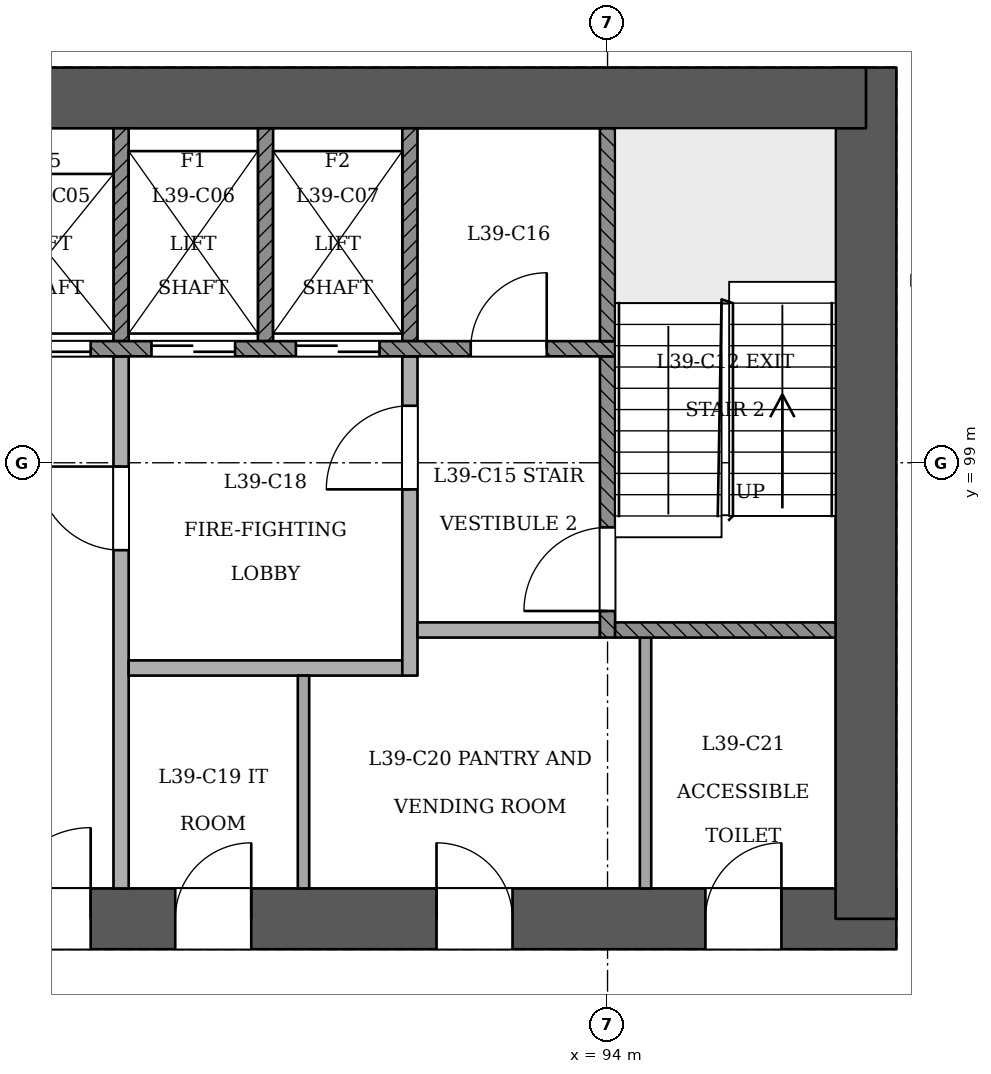
"""IFC4 building model, lengths in metres.
Left out: names, types, materials, properties, quantities, classifications, styles, units other than length and angle.
Written with IfcOpenShell. Run it as: python <this file> out.ifc"""

import sys

from ifc_helpers import new_model, si_unit, direction, frame, frame_2d, origin, place, context, subcontext, project, spatial, rectangle, extrude, element, fill, save


model = new_model("IFC4")
c1 = context("Model", 3, precision=1e-05, world=origin(), true_north=direction((0.0, 1.0)))
c2 = subcontext(c1, "Body", "Model", "MODEL_VIEW")
j1 = project(units=[si_unit("LENGTHUNIT", "METRE"), si_unit("PLANEANGLEUNIT", "RADIAN")], contexts=[c1])
p1 = place(None, origin())
s1 = spatial("IfcSite", under=j1, at=p1, CompositionType="ELEMENT")
p2 = place(p1, origin())
s2 = spatial("IfcBuilding", under=s1, at=p2, CompositionType="ELEMENT")
p3 = place(p2, frame((0.0, 0.0, 153.0)))
s3 = spatial("IfcBuildingStorey", under=s2, at=p3, CompositionType="ELEMENT", Elevation=153.0)
p4 = place(p3, frame((72.6, 93.0, 0.0), z_axis=(0.0, 0.0, 1.0), x_axis=(1.0, 0.0, 0.0)))
e1 = element("IfcWall", 1, at=p4, inside=s3, PredefinedType="SHEAR", context=c2, shape_type="SweptSolid", body=[
    extrude(rectangle(XDim=25.2, YDim=0.8, at=frame_2d((12.6, 0.0))), origin(), (0.0, 0.0, 1.0), 3.6),
])
p5 = place(p4, frame((1.2, 0.0, 0.0)))
e2 = element("IfcOpeningElement", 2, at=p5, cuts=e1, PredefinedType="OPENING", context=c2, shape_type="SweptSolid", body=[
    extrude(rectangle(XDim=1.2, YDim=2.1, at=frame_2d((0.6, 1.05))), frame((0.0, 0.411, 0.0), z_axis=(0.0, -1.0, 0.0), x_axis=(1.0, 0.0, 0.0)), (0.0, 0.0, 1.0), 0.821),
])
p6 = place(p4, frame((3.4, 0.0, 0.0)))
e3 = element("IfcOpeningElement", 3, at=p6, cuts=e1, PredefinedType="OPENING", context=c2, shape_type="SweptSolid", body=[
    extrude(rectangle(XDim=1.2, YDim=2.1, at=frame_2d((0.6, 1.05))), frame((0.0, 0.411, 0.0), z_axis=(0.0, -1.0, 0.0), x_axis=(1.0, 0.0, 0.0)), (0.0, 0.0, 1.0), 0.821),
])
p7 = place(p4, frame((13.4, 0.0, 0.0)))
e4 = element("IfcOpeningElement", 4, at=p7, cuts=e1, PredefinedType="OPENING", context=c2, shape_type="SweptSolid", body=[
    extrude(rectangle(XDim=1.2, YDim=2.1, at=frame_2d((0.6, 1.05))), frame((0.0, 0.411, 0.0), z_axis=(0.0, -1.0, 0.0), x_axis=(1.0, 0.0, 0.0)), (0.0, 0.0, 1.0), 0.821),
])
p8 = place(p4, frame((15.712, 0.0, 0.0)))
e5 = element("IfcOpeningElement", 5, at=p8, cuts=e1, PredefinedType="OPENING", context=c2, shape_type="SweptSolid", body=[
    extrude(rectangle(XDim=1.0, YDim=2.1, at=frame_2d((0.5, 1.05))), frame((0.0, 0.411, 0.0), z_axis=(0.0, -1.0, 0.0), x_axis=(1.0, 0.0, 0.0)), (0.0, 0.0, 1.0), 0.821),
])
p9 = place(p4, frame((19.15, 0.0, 0.0)))
e6 = element("IfcOpeningElement", 6, at=p9, cuts=e1, PredefinedType="OPENING", context=c2, shape_type="SweptSolid", body=[
    extrude(rectangle(XDim=1.0, YDim=2.1, at=frame_2d((0.5, 1.05))), frame((0.0, 0.411, 0.0), z_axis=(0.0, -1.0, 0.0), x_axis=(1.0, 0.0, 0.0)), (0.0, 0.0, 1.0), 0.821),
])
p10 = place(p4, frame((22.688, 0.0, 0.0)))
e7 = element("IfcOpeningElement", 7, at=p10, cuts=e1, PredefinedType="OPENING", context=c2, shape_type="SweptSolid", body=[
    extrude(rectangle(XDim=1.0, YDim=2.1, at=frame_2d((0.5, 1.05))), frame((0.0, 0.411, 0.0), z_axis=(0.0, -1.0, 0.0), x_axis=(1.0, 0.0, 0.0)), (0.0, 0.0, 1.0), 0.821),
])
p11 = place(p3, frame((97.4, 93.0, 0.0), z_axis=(0.0, 0.0, 1.0), x_axis=(0.0, 1.0, 0.0)))
e8 = element("IfcWall", 8, at=p11, inside=s3, PredefinedType="SHEAR", context=c2, shape_type="SweptSolid", body=[
    extrude(rectangle(XDim=11.2, YDim=0.8, at=frame_2d((5.6, 0.0))), origin(), (0.0, 0.0, 1.0), 3.6),
])
p12 = place(p3, frame((97.4, 103.8, 0.0), z_axis=(0.0, 0.0, 1.0), x_axis=(-1.0, 0.0, 0.0)))
e9 = element("IfcWall", 9, at=p12, inside=s3, PredefinedType="SHEAR", context=c2, shape_type="SweptSolid", body=[
    extrude(rectangle(XDim=25.2, YDim=0.8, at=frame_2d((12.6, 0.0))), origin(), (0.0, 0.0, 1.0), 3.6),
])
p13 = place(p3, frame((85.065, 64.811, 0.0), z_axis=(0.0, 0.0, 1.0), x_axis=(0.500003399299, 0.866023441189, 0.0)))
e10 = element("IfcWall", 10, at=p13, inside=s3, PredefinedType="PARTITIONING", context=c2, shape_type="SweptSolid", body=[
    extrude(rectangle(XDim=37.385, YDim=0.15, at=frame_2d((18.693, 0.0))), origin(), (0.0, 0.0, 1.0), 2.75),
])
p14 = place(p13, frame((0.524, 0.0, 0.0)))
e11 = element("IfcOpeningElement", 11, at=p14, cuts=e10, PredefinedType="OPENING", context=c2, shape_type="SweptSolid", body=[
    extrude(rectangle(XDim=1.2, YDim=2.1, at=frame_2d((0.6, 1.05))), frame((0.0, 0.085, 0.0), z_axis=(0.0, -1.0, 0.0), x_axis=(1.0, 0.0, 0.0)), (0.0, 0.0, 1.0), 0.171),
])
p15 = place(p13, frame((12.036, 0.0, 0.0)))
e12 = element("IfcOpeningElement", 12, at=p15, cuts=e10, PredefinedType="OPENING", context=c2, shape_type="SweptSolid", body=[
    extrude(rectangle(XDim=1.2, YDim=2.1, at=frame_2d((0.6, 1.05))), frame((0.0, 0.085, 0.0), z_axis=(0.0, -1.0, 0.0), x_axis=(1.0, 0.0, 0.0)), (0.0, 0.0, 1.0), 0.171),
])
p16 = place(p13, frame((22.186, 0.0, 0.0)))
e13 = element("IfcOpeningElement", 13, at=p16, cuts=e10, PredefinedType="OPENING", context=c2, shape_type="SweptSolid", body=[
    extrude(rectangle(XDim=1.2, YDim=2.1, at=frame_2d((0.6, 1.05))), frame((0.0, 0.085, 0.0), z_axis=(0.0, -1.0, 0.0), x_axis=(1.0, 0.0, 0.0)), (0.0, 0.0, 1.0), 0.171),
])
p17 = place(p13, frame((31.186, 0.0, 0.0)))
e14 = element("IfcOpeningElement", 14, at=p17, cuts=e10, PredefinedType="OPENING", context=c2, shape_type="SweptSolid", body=[
    extrude(rectangle(XDim=1.2, YDim=2.1, at=frame_2d((0.6, 1.05))), frame((0.0, 0.085, 0.0), z_axis=(0.0, -1.0, 0.0), x_axis=(1.0, 0.0, 0.0)), (0.0, 0.0, 1.0), 0.171),
])
p18 = place(p3, frame((87.6, 93.4, 0.0), z_axis=(0.0, 0.0, 1.0), x_axis=(0.0, 1.0, 0.0)))
e15 = element("IfcWall", 15, at=p18, inside=s3, PredefinedType="PARTITIONING", context=c2, shape_type="SweptSolid", body=[
    extrude(rectangle(XDim=7.0, YDim=0.2, at=frame_2d((3.5, 0.0))), origin(), (0.0, 0.0, 1.0), 3.15),
])
p19 = place(p18, frame((4.45, 0.0, 0.0)))
e16 = element("IfcOpeningElement", 16, at=p19, cuts=e15, PredefinedType="OPENING", context=c2, shape_type="SweptSolid", body=[
    extrude(rectangle(XDim=1.1, YDim=2.1, at=frame_2d((0.55, 1.05))), frame((0.0, 0.11, 0.0), z_axis=(0.0, -1.0, 0.0), x_axis=(1.0, 0.0, 0.0)), (0.0, 0.0, 1.0), 0.221),
])
p20 = place(p3, frame((90.0, 93.4, 0.0), z_axis=(0.0, 0.0, 1.0), x_axis=(0.0, 1.0, 0.0)))
e17 = element("IfcWall", 17, at=p20, inside=s3, PredefinedType="PARTITIONING", context=c2, shape_type="SweptSolid", body=[
    extrude(rectangle(XDim=2.8, YDim=0.15, at=frame_2d((1.4, 0.0))), origin(), (0.0, 0.0, 1.0), 3.15),
])
p21 = place(p3, frame((94.5, 93.4, 0.0), z_axis=(0.0, 0.0, 1.0), x_axis=(0.0, 1.0, 0.0)))
e18 = element("IfcWall", 18, at=p21, inside=s3, PredefinedType="PARTITIONING", context=c2, shape_type="SweptSolid", body=[
    extrude(rectangle(XDim=3.3, YDim=0.15, at=frame_2d((1.65, 0.0))), origin(), (0.0, 0.0, 1.0), 3.15),
])
p22 = place(p3, frame((87.7, 96.3, 0.0), z_axis=(0.0, 0.0, 1.0), x_axis=(1.0, 0.0, 0.0)))
e19 = element("IfcWall", 19, at=p22, inside=s3, PredefinedType="PARTITIONING", context=c2, shape_type="SweptSolid", body=[
    extrude(rectangle(XDim=3.6, YDim=0.2, at=frame_2d((1.8, 0.0))), origin(), (0.0, 0.0, 1.0), 3.15),
])
p23 = place(p3, frame((91.4, 96.2, 0.0), z_axis=(0.0, 0.0, 1.0), x_axis=(0.0, 1.0, 0.0)))
e20 = element("IfcWall", 20, at=p23, inside=s3, PredefinedType="PARTITIONING", context=c2, shape_type="SweptSolid", body=[
    extrude(rectangle(XDim=4.2, YDim=0.2, at=frame_2d((2.1, 0.0))), origin(), (0.0, 0.0, 1.0), 3.15),
])
p24 = place(p23, frame((2.45, 0.0, 0.0)))
e21 = element("IfcOpeningElement", 21, at=p24, cuts=e20, PredefinedType="OPENING", context=c2, shape_type="SweptSolid", body=[
    extrude(rectangle(XDim=1.1, YDim=2.1, at=frame_2d((0.55, 1.05))), frame((0.0, 0.11, 0.0), z_axis=(0.0, -1.0, 0.0), x_axis=(1.0, 0.0, 0.0)), (0.0, 0.0, 1.0), 0.221),
])
p25 = place(p3, frame((91.5, 96.8, 0.0), z_axis=(0.0, 0.0, 1.0), x_axis=(1.0, 0.0, 0.0)))
e22 = element("IfcWall", 22, at=p25, inside=s3, PredefinedType="PARTITIONING", context=c2, shape_type="SweptSolid", body=[
    extrude(rectangle(XDim=2.4, YDim=0.2, at=frame_2d((1.2, 0.0))), origin(), (0.0, 0.0, 1.0), 3.15),
])
p26 = place(p3, frame((94.0, 96.7, 0.0), z_axis=(0.0, 0.0, 1.0), x_axis=(0.0, 1.0, 0.0)))
e23 = element("IfcWall", 23, at=p26, inside=s3, PredefinedType="SOLIDWALL", context=c2, shape_type="SweptSolid", body=[
    extrude(rectangle(XDim=3.7, YDim=0.2, at=frame_2d((1.85, 0.0))), origin(), (0.0, 0.0, 1.0), 3.15),
])
p27 = place(p26, frame((0.35, 0.0, 0.0)))
e24 = element("IfcOpeningElement", 24, at=p27, cuts=e23, PredefinedType="OPENING", context=c2, shape_type="SweptSolid", body=[
    extrude(rectangle(XDim=1.1, YDim=2.1, at=frame_2d((0.55, 1.05))), frame((0.0, 0.11, 0.0), z_axis=(0.0, -1.0, 0.0), x_axis=(1.0, 0.0, 0.0)), (0.0, 0.0, 1.0), 0.221),
])
p28 = place(p3, frame((94.1, 96.8, 0.0), z_axis=(0.0, 0.0, 1.0), x_axis=(1.0, 0.0, 0.0)))
e25 = element("IfcWall", 25, at=p28, inside=s3, PredefinedType="SOLIDWALL", context=c2, shape_type="SweptSolid", body=[
    extrude(rectangle(XDim=2.9, YDim=0.2, at=frame_2d((1.45, 0.0))), origin(), (0.0, 0.0, 1.0), 3.15),
])
p29 = place(p3, frame((75.9, 100.5, 0.0), z_axis=(0.0, 0.0, 1.0), x_axis=(1.0, 0.0, 0.0)))
e26 = element("IfcWall", 26, at=p29, inside=s3, PredefinedType="SOLIDWALL", context=c2, shape_type="SweptSolid", body=[
    extrude(rectangle(XDim=18.2, YDim=0.2, at=frame_2d((9.1, 0.0))), origin(), (0.0, 0.0, 1.0), 3.15),
])
p30 = place(p29, frame((2.6, 0.0, 0.0)))
e27 = element("IfcOpeningElement", 27, at=p30, cuts=e26, PredefinedType="OPENING", context=c2, shape_type="SweptSolid", body=[
    extrude(rectangle(XDim=1.1, YDim=2.1, at=frame_2d((0.55, 1.05))), frame((0.0, 0.11, 0.0), z_axis=(0.0, -1.0, 0.0), x_axis=(1.0, 0.0, 0.0)), (0.0, 0.0, 1.0), 0.221),
])
p31 = place(p29, frame((4.5, 0.0, 0.0)))
e28 = element("IfcOpeningElement", 28, at=p31, cuts=e26, PredefinedType="OPENING", context=c2, shape_type="SweptSolid", body=[
    extrude(rectangle(XDim=1.1, YDim=2.1, at=frame_2d((0.55, 1.05))), frame((0.0, 0.11, 0.0), z_axis=(0.0, -1.0, 0.0), x_axis=(1.0, 0.0, 0.0)), (0.0, 0.0, 1.0), 0.221),
])
p32 = place(p29, frame((6.4, 0.0, 0.0)))
e29 = element("IfcOpeningElement", 29, at=p32, cuts=e26, PredefinedType="OPENING", context=c2, shape_type="SweptSolid", body=[
    extrude(rectangle(XDim=1.1, YDim=2.1, at=frame_2d((0.55, 1.05))), frame((0.0, 0.11, 0.0), z_axis=(0.0, -1.0, 0.0), x_axis=(1.0, 0.0, 0.0)), (0.0, 0.0, 1.0), 0.221),
])
p33 = place(p29, frame((8.3, 0.0, 0.0)))
e30 = element("IfcOpeningElement", 30, at=p33, cuts=e26, PredefinedType="OPENING", context=c2, shape_type="SweptSolid", body=[
    extrude(rectangle(XDim=1.1, YDim=2.1, at=frame_2d((0.55, 1.05))), frame((0.0, 0.11, 0.0), z_axis=(0.0, -1.0, 0.0), x_axis=(1.0, 0.0, 0.0)), (0.0, 0.0, 1.0), 0.221),
])
p34 = place(p29, frame((10.2, 0.0, 0.0)))
e31 = element("IfcOpeningElement", 31, at=p34, cuts=e26, PredefinedType="OPENING", context=c2, shape_type="SweptSolid", body=[
    extrude(rectangle(XDim=1.1, YDim=2.1, at=frame_2d((0.55, 1.05))), frame((0.0, 0.11, 0.0), z_axis=(0.0, -1.0, 0.0), x_axis=(1.0, 0.0, 0.0)), (0.0, 0.0, 1.0), 0.221),
])
p35 = place(p29, frame((12.1, 0.0, 0.0)))
e32 = element("IfcOpeningElement", 32, at=p35, cuts=e26, PredefinedType="OPENING", context=c2, shape_type="SweptSolid", body=[
    extrude(rectangle(XDim=1.1, YDim=2.1, at=frame_2d((0.55, 1.05))), frame((0.0, 0.11, 0.0), z_axis=(0.0, -1.0, 0.0), x_axis=(1.0, 0.0, 0.0)), (0.0, 0.0, 1.0), 0.221),
])
p36 = place(p29, frame((14.0, 0.0, 0.0)))
e33 = element("IfcOpeningElement", 33, at=p36, cuts=e26, PredefinedType="OPENING", context=c2, shape_type="SweptSolid", body=[
    extrude(rectangle(XDim=1.1, YDim=2.1, at=frame_2d((0.55, 1.05))), frame((0.0, 0.11, 0.0), z_axis=(0.0, -1.0, 0.0), x_axis=(1.0, 0.0, 0.0)), (0.0, 0.0, 1.0), 0.221),
])
p37 = place(p29, frame((0.65, 0.0, 0.0)))
e34 = element("IfcOpeningElement", 34, at=p37, cuts=e26, PredefinedType="OPENING", context=c2, shape_type="SweptSolid", body=[
    extrude(rectangle(XDim=1.0, YDim=2.1, at=frame_2d((0.5, 1.05))), frame((0.0, 0.11, 0.0), z_axis=(0.0, -1.0, 0.0), x_axis=(1.0, 0.0, 0.0)), (0.0, 0.0, 1.0), 0.221),
])
p38 = place(p29, frame((16.3, 0.0, 0.0)))
e35 = element("IfcOpeningElement", 35, at=p38, cuts=e26, PredefinedType="OPENING", context=c2, shape_type="SweptSolid", body=[
    extrude(rectangle(XDim=1.0, YDim=2.1, at=frame_2d((0.5, 1.05))), frame((0.0, 0.11, 0.0), z_axis=(0.0, -1.0, 0.0), x_axis=(1.0, 0.0, 0.0)), (0.0, 0.0, 1.0), 0.221),
])
for number, where, z_axis, x_axis in (
    (36, (87.6, 100.6, 0.0), (0.0, 0.0, 1.0), (0.0, 1.0, 0.0)),
    (37, (89.5, 100.6, 0.0), (0.0, 0.0, 1.0), (0.0, 1.0, 0.0)),
    (38, (91.4, 100.6, 0.0), (0.0, 0.0, 1.0), (0.0, 1.0, 0.0)),
    (39, (94.0, 100.6, 0.0), (0.0, 0.0, 1.0), (0.0, 1.0, 0.0)),
):
    element("IfcWall", number, at=place(p3, frame(where, z_axis=z_axis, x_axis=x_axis)), inside=s3, PredefinedType="SOLIDWALL", context=c2, shape_type="SweptSolid", body=[
        extrude(rectangle(XDim=2.8, YDim=0.2, at=frame_2d((1.4, 0.0))), origin(), (0.0, 0.0, 1.0), 3.15),
    ])
p39 = place(p34, origin())
e40 = element("IfcDoor", 40, at=p39, inside=s3, OperationType="SLIDING_TO_RIGHT", PredefinedType="NOTDEFINED", context=c2, shape_type="SweptSolid", body=[
    extrude(rectangle(XDim=1.1, YDim=2.1, at=frame_2d((0.55, 1.05))), frame((0.0, 0.025, 0.0), z_axis=(0.0, -1.0, 0.0), x_axis=(1.0, 0.0, 0.0)), (0.0, 0.0, 1.0), 0.05),
])
fill(e31, e40)
p40 = place(p35, origin())
e41 = element("IfcDoor", 41, at=p40, inside=s3, OperationType="SLIDING_TO_RIGHT", PredefinedType="NOTDEFINED", context=c2, shape_type="SweptSolid", body=[
    extrude(rectangle(XDim=1.1, YDim=2.1, at=frame_2d((0.55, 1.05))), frame((0.0, 0.025, 0.0), z_axis=(0.0, -1.0, 0.0), x_axis=(1.0, 0.0, 0.0)), (0.0, 0.0, 1.0), 0.05),
])
fill(e32, e41)
p41 = place(p36, origin())
e42 = element("IfcDoor", 42, at=p41, inside=s3, OperationType="SLIDING_TO_LEFT", PredefinedType="NOTDEFINED", context=c2, shape_type="SweptSolid", body=[
    extrude(rectangle(XDim=1.1, YDim=2.1, at=frame_2d((0.55, 1.05))), frame((0.0, 0.025, 0.0), z_axis=(0.0, -1.0, 0.0), x_axis=(1.0, 0.0, 0.0)), (0.0, 0.0, 1.0), 0.05),
])
fill(e33, e42)
p42 = place(p27, origin())
e43 = element("IfcDoor", 43, at=p42, inside=s3, OperationType="SINGLE_SWING_LEFT", PredefinedType="NOTDEFINED", context=c2, shape_type="SweptSolid", body=[
    extrude(rectangle(XDim=1.1, YDim=2.1, at=frame_2d((0.55, 1.05))), frame((0.0, 0.025, 0.0), z_axis=(0.0, -1.0, 0.0), x_axis=(1.0, 0.0, 0.0)), (0.0, 0.0, 1.0), 0.05),
])
fill(e24, e43)
p43 = place(p19, origin())
e44 = element("IfcDoor", 44, at=p43, inside=s3, OperationType="SINGLE_SWING_RIGHT", PredefinedType="NOTDEFINED", context=c2, shape_type="SweptSolid", body=[
    extrude(rectangle(XDim=1.1, YDim=2.1, at=frame_2d((0.55, 1.05))), frame((0.0, 0.025, 0.0), z_axis=(0.0, -1.0, 0.0), x_axis=(1.0, 0.0, 0.0)), (0.0, 0.0, 1.0), 0.05),
])
fill(e16, e44)
p44 = place(p24, origin())
e45 = element("IfcDoor", 45, at=p44, inside=s3, OperationType="SINGLE_SWING_LEFT", PredefinedType="NOTDEFINED", context=c2, shape_type="SweptSolid", body=[
    extrude(rectangle(XDim=1.1, YDim=2.1, at=frame_2d((0.55, 1.05))), frame((0.0, 0.025, 0.0), z_axis=(0.0, -1.0, 0.0), x_axis=(1.0, 0.0, 0.0)), (0.0, 0.0, 1.0), 0.05),
])
fill(e21, e45)
p45 = place(p7, origin())
e46 = element("IfcDoor", 46, at=p45, inside=s3, OperationType="SINGLE_SWING_RIGHT", PredefinedType="NOTDEFINED", context=c2, shape_type="SweptSolid", body=[
    extrude(rectangle(XDim=1.2, YDim=2.1, at=frame_2d((0.6, 1.05))), frame((0.0, 0.025, 0.0), z_axis=(0.0, -1.0, 0.0), x_axis=(1.0, 0.0, 0.0)), (0.0, 0.0, 1.0), 0.05),
])
fill(e4, e46)
p46 = place(p38, origin())
e47 = element("IfcDoor", 47, at=p46, inside=s3, OperationType="SINGLE_SWING_RIGHT", PredefinedType="NOTDEFINED", context=c2, shape_type="SweptSolid", body=[
    extrude(rectangle(XDim=1.0, YDim=2.1, at=frame_2d((0.5, 1.05))), frame((0.0, 0.025, 0.0), z_axis=(0.0, -1.0, 0.0), x_axis=(1.0, 0.0, 0.0)), (0.0, 0.0, 1.0), 0.05),
])
fill(e35, e47)
p47 = place(p8, origin())
e48 = element("IfcDoor", 48, at=p47, inside=s3, OperationType="SINGLE_SWING_RIGHT", PredefinedType="NOTDEFINED", context=c2, shape_type="SweptSolid", body=[
    extrude(rectangle(XDim=1.0, YDim=2.1, at=frame_2d((0.5, 1.05))), frame((0.0, 0.025, 0.0), z_axis=(0.0, -1.0, 0.0), x_axis=(1.0, 0.0, 0.0)), (0.0, 0.0, 1.0), 0.05),
])
fill(e5, e48)
p48 = place(p9, origin())
e49 = element("IfcDoor", 49, at=p48, inside=s3, OperationType="SINGLE_SWING_LEFT", PredefinedType="NOTDEFINED", context=c2, shape_type="SweptSolid", body=[
    extrude(rectangle(XDim=1.0, YDim=2.1, at=frame_2d((0.5, 1.05))), frame((0.0, 0.025, 0.0), z_axis=(0.0, -1.0, 0.0), x_axis=(1.0, 0.0, 0.0)), (0.0, 0.0, 1.0), 0.05),
])
fill(e6, e49)
p49 = place(p10, origin())
e50 = element("IfcDoor", 50, at=p49, inside=s3, OperationType="SINGLE_SWING_RIGHT", PredefinedType="NOTDEFINED", context=c2, shape_type="SweptSolid", body=[
    extrude(rectangle(XDim=1.0, YDim=2.1, at=frame_2d((0.5, 1.05))), frame((0.0, 0.025, 0.0), z_axis=(0.0, -1.0, 0.0), x_axis=(1.0, 0.0, 0.0)), (0.0, 0.0, 1.0), 0.05),
])
fill(e7, e50)
save(model, sys.argv[1])
